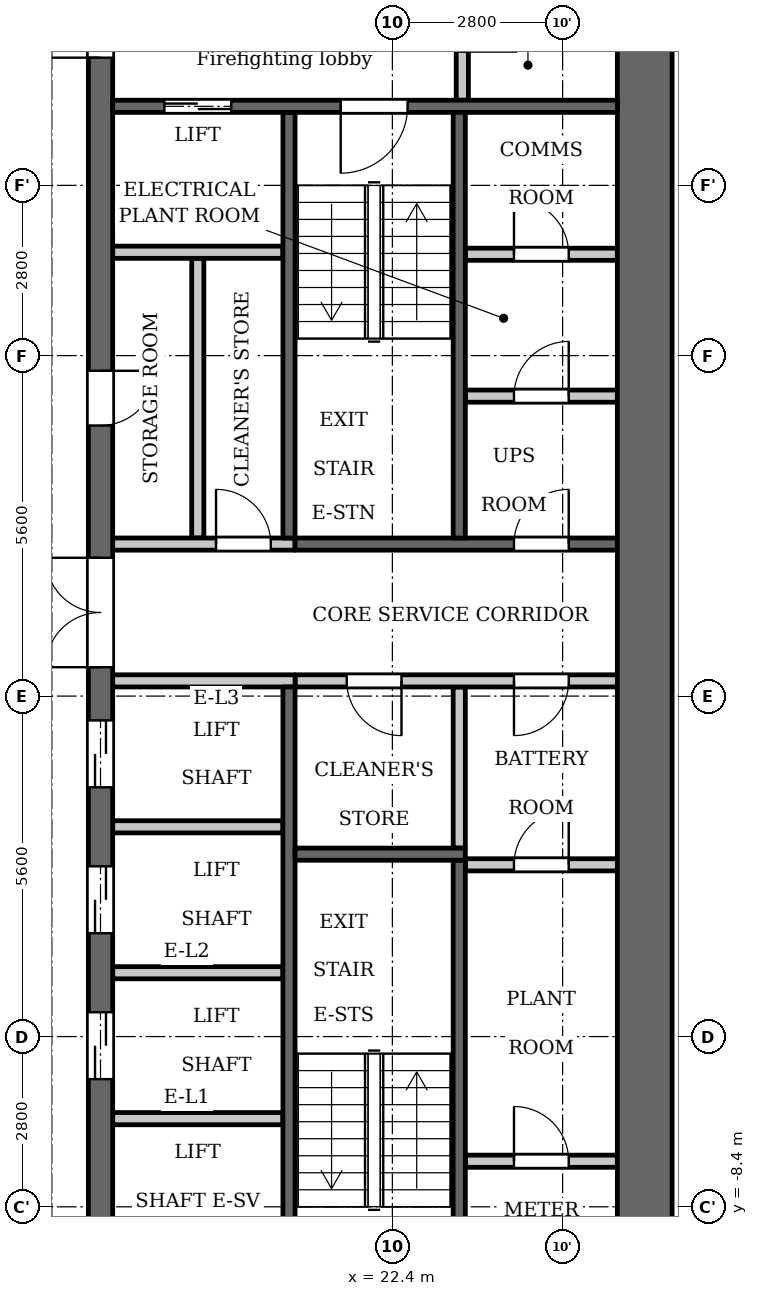
"""IFC4 building model, lengths in metres.
Left out: names, types, materials, properties, quantities, classifications, styles, units other than length and angle.
Written with IfcOpenShell. Run it as: python <this file> out.ifc"""

import sys

from ifc_helpers import new_model, si_unit, direction, frame, frame_2d, origin, place, context, subcontext, project, spatial, rectangle, extrude, element, fill, save


model = new_model("IFC4")
c1 = context("Model", 3, precision=1e-05, world=origin(), true_north=direction((0.0, 1.0)))
c2 = subcontext(c1, "Body", "Model", "MODEL_VIEW")
j1 = project(units=[si_unit("LENGTHUNIT", "METRE"), si_unit("PLANEANGLEUNIT", "RADIAN")], contexts=[c1])
p1 = place(None, origin())
s1 = spatial("IfcSite", under=j1, at=p1, CompositionType="ELEMENT")
p2 = place(p1, origin())
s2 = spatial("IfcBuilding", under=s1, at=p2, CompositionType="ELEMENT")
p3 = place(p2, frame((0.0, 0.0, 41.0)))
s3 = spatial("IfcBuildingStorey", under=s2, at=p3, CompositionType="ELEMENT", Elevation=41.0)
p4 = place(p3, frame((23.5, -2.5, 0.0), z_axis=(0.0, 0.0, 1.0), x_axis=(0.0, 1.0, 0.0)))
e1 = element("IfcWall", 1, at=p4, inside=s3, PredefinedType="PARTITIONING", context=c2, shape_type="SweptSolid", body=[
    extrude(rectangle(XDim=2.65, YDim=0.2, at=frame_2d((1.325, 0.0))), origin(), (0.0, 0.0, 1.0), 3.2),
])
p5 = place(p3, frame((20.7, 2.6, 0.0), z_axis=(0.0, 0.0, 1.0), x_axis=(0.0, 1.0, 0.0)))
e2 = element("IfcWall", 2, at=p5, inside=s3, PredefinedType="SHEAR", context=c2, shape_type="SweptSolid", body=[
    extrude(rectangle(XDim=7.0, YDim=0.2, at=frame_2d((3.5, 0.0))), origin(), (0.0, 0.0, 1.0), 3.2),
])
p6 = place(p3, frame((20.7, -9.6, 0.0), z_axis=(0.0, 0.0, 1.0), x_axis=(0.0, 1.0, 0.0)))
e3 = element("IfcWall", 3, at=p6, inside=s3, PredefinedType="SHEAR", context=c2, shape_type="SweptSolid", body=[
    extrude(rectangle(XDim=9.75, YDim=0.2, at=frame_2d((4.875, 0.0))), origin(), (0.0, 0.0, 1.0), 3.2),
])
p7 = place(p3, frame((20.8, 2.5, 0.0), z_axis=(0.0, 0.0, 1.0), x_axis=(1.0, 0.0, 0.0)))
e4 = element("IfcWall", 4, at=p7, inside=s3, PredefinedType="SHEAR", context=c2, shape_type="SweptSolid", body=[
    extrude(rectangle(XDim=5.3, YDim=0.2, at=frame_2d((2.65, 0.0))), origin(), (0.0, 0.0, 1.0), 3.2),
])
p8 = place(p7, frame((3.6, 0.0, 0.0)))
e5 = element("IfcOpeningElement", 5, at=p8, cuts=e4, PredefinedType="OPENING", context=c2, shape_type="SweptSolid", body=[
    extrude(rectangle(XDim=0.9, YDim=2.1, at=frame_2d((0.45, 1.05))), frame((0.0, 0.11, 0.0), z_axis=(0.0, -1.0, 0.0), x_axis=(1.0, 0.0, 0.0)), (0.0, 0.0, 1.0), 0.22),
])
p9 = place(p3, frame((20.8, 0.25, 0.0), z_axis=(0.0, 0.0, 1.0), x_axis=(1.0, 0.0, 0.0)))
e6 = element("IfcWall", 6, at=p9, inside=s3, PredefinedType="PARTITIONING", context=c2, shape_type="SweptSolid", body=[
    extrude(rectangle(XDim=5.3, YDim=0.2, at=frame_2d((2.65, 0.0))), origin(), (0.0, 0.0, 1.0), 3.2),
])
p10 = place(p9, frame((0.85, 0.0, 0.0)))
e7 = element("IfcOpeningElement", 7, at=p10, cuts=e6, PredefinedType="OPENING", context=c2, shape_type="SweptSolid", body=[
    extrude(rectangle(XDim=0.9, YDim=2.1, at=frame_2d((0.45, 1.05))), frame((0.0, 0.11, 0.0), z_axis=(0.0, -1.0, 0.0), x_axis=(1.0, 0.0, 0.0)), (0.0, 0.0, 1.0), 0.22),
])
p11 = place(p9, frame((3.6, 0.0, 0.0)))
e8 = element("IfcOpeningElement", 8, at=p11, cuts=e6, PredefinedType="OPENING", context=c2, shape_type="SweptSolid", body=[
    extrude(rectangle(XDim=0.9, YDim=2.1, at=frame_2d((0.45, 1.05))), frame((0.0, 0.11, 0.0), z_axis=(0.0, -1.0, 0.0), x_axis=(1.0, 0.0, 0.0)), (0.0, 0.0, 1.0), 0.22),
])
p12 = place(p3, frame((19.2, 2.6, 0.0), z_axis=(0.0, 0.0, 1.0), x_axis=(0.0, 1.0, 0.0)))
e9 = element("IfcWall", 9, at=p12, inside=s3, PredefinedType="PARTITIONING", context=c2, shape_type="SweptSolid", body=[
    extrude(rectangle(XDim=4.6, YDim=0.2, at=frame_2d((2.3, 0.0))), origin(), (0.0, 0.0, 1.0), 3.2),
])
p13 = place(p3, frame((17.6, -12.3, 0.0), z_axis=(0.0, 0.0, 1.0), x_axis=(0.0, 1.0, 0.0)))
e10 = element("IfcWall", 10, at=p13, inside=s3, PredefinedType="SHEAR", context=c2, shape_type="SweptSolid", body=[
    extrude(rectangle(XDim=24.6, YDim=0.4, at=frame_2d((12.3, 0.0))), origin(), (0.0, 0.0, 1.0), 3.2),
])
p14 = place(p13, frame((6.0, 0.0, 0.0)))
e11 = element("IfcOpeningElement", 11, at=p14, cuts=e10, PredefinedType="OPENING", context=c2, shape_type="SweptSolid", body=[
    extrude(rectangle(XDim=1.1, YDim=2.1, at=frame_2d((0.55, 1.05))), frame((0.0, 0.21, 0.0), z_axis=(0.0, -1.0, 0.0), x_axis=(1.0, 0.0, 0.0)), (0.0, 0.0, 1.0), 0.42),
])
p15 = place(p13, frame((8.4, 0.0, 0.0)))
e12 = element("IfcOpeningElement", 12, at=p15, cuts=e10, PredefinedType="OPENING", context=c2, shape_type="SweptSolid", body=[
    extrude(rectangle(XDim=1.1, YDim=2.1, at=frame_2d((0.55, 1.05))), frame((0.0, 0.21, 0.0), z_axis=(0.0, -1.0, 0.0), x_axis=(1.0, 0.0, 0.0)), (0.0, 0.0, 1.0), 0.42),
])
p16 = place(p13, frame((10.8, 0.0, 0.0)))
e13 = element("IfcOpeningElement", 13, at=p16, cuts=e10, PredefinedType="OPENING", context=c2, shape_type="SweptSolid", body=[
    extrude(rectangle(XDim=1.1, YDim=2.1, at=frame_2d((0.55, 1.05))), frame((0.0, 0.21, 0.0), z_axis=(0.0, -1.0, 0.0), x_axis=(1.0, 0.0, 0.0)), (0.0, 0.0, 1.0), 0.42),
])
p17 = place(p13, frame((16.75, 0.0, 0.0)))
e14 = element("IfcOpeningElement", 14, at=p17, cuts=e10, PredefinedType="OPENING", context=c2, shape_type="SweptSolid", body=[
    extrude(rectangle(XDim=0.9, YDim=2.1, at=frame_2d((0.45, 1.05))), frame((0.0, 0.21, 0.0), z_axis=(0.0, -1.0, 0.0), x_axis=(1.0, 0.0, 0.0)), (0.0, 0.0, 1.0), 0.42),
])
p18 = place(p13, frame((22.8, 0.0, 0.0)))
e15 = element("IfcOpeningElement", 15, at=p18, cuts=e10, PredefinedType="OPENING", context=c2, shape_type="SweptSolid", body=[
    extrude(rectangle(XDim=1.1, YDim=2.1, at=frame_2d((0.55, 1.05))), frame((0.0, 0.21, 0.0), z_axis=(0.0, -1.0, 0.0), x_axis=(1.0, 0.0, 0.0)), (0.0, 0.0, 1.0), 0.42),
])
p19 = place(p13, frame((0.7, 0.0, 0.0)))
e16 = element("IfcOpeningElement", 16, at=p19, cuts=e10, PredefinedType="OPENING", context=c2, shape_type="SweptSolid", body=[
    extrude(rectangle(XDim=1.1, YDim=2.1, at=frame_2d((0.55, 1.05))), frame((0.0, 0.21, 0.0), z_axis=(0.0, -1.0, 0.0), x_axis=(1.0, 0.0, 0.0)), (0.0, 0.0, 1.0), 0.42),
])
p20 = place(p13, frame((12.775, 0.0, 0.0)))
e17 = element("IfcOpeningElement", 17, at=p20, cuts=e10, PredefinedType="OPENING", context=c2, shape_type="SweptSolid", body=[
    extrude(rectangle(XDim=1.8, YDim=2.1, at=frame_2d((0.9, 1.05))), frame((0.0, 0.21, 0.0), z_axis=(0.0, -1.0, 0.0), x_axis=(1.0, 0.0, 0.0)), (0.0, 0.0, 1.0), 0.42),
])
p21 = place(p3, frame((26.55, -12.3, 0.0), z_axis=(0.0, 0.0, 1.0), x_axis=(0.0, 1.0, 0.0)))
e18 = element("IfcWall", 18, at=p21, inside=s3, PredefinedType="SHEAR", context=c2, shape_type="SweptSolid", body=[
    extrude(rectangle(XDim=24.6, YDim=0.9, at=frame_2d((12.3, 0.0))), origin(), (0.0, 0.0, 1.0), 3.2),
])
p22 = place(p3, frame((23.55, 9.8, 0.0), z_axis=(0.0, 0.0, 1.0), x_axis=(0.0, 1.0, 0.0)))
e19 = element("IfcWall", 19, at=p22, inside=s3, PredefinedType="PARTITIONING", context=c2, shape_type="SweptSolid", body=[
    extrude(rectangle(XDim=2.5, YDim=0.2, at=frame_2d((1.25, 0.0))), origin(), (0.0, 0.0, 1.0), 3.2),
])
p23 = place(p22, frame((0.8, 0.0, 0.0)))
e20 = element("IfcOpeningElement", 20, at=p23, cuts=e19, PredefinedType="OPENING", context=c2, shape_type="SweptSolid", body=[
    extrude(rectangle(XDim=0.9, YDim=2.1, at=frame_2d((0.45, 1.05))), frame((0.0, 0.11, 0.0), z_axis=(0.0, -1.0, 0.0), x_axis=(1.0, 0.0, 0.0)), (0.0, 0.0, 1.0), 0.22),
])
p24 = place(p3, frame((23.6, -7.65, 0.0), z_axis=(0.0, 0.0, 1.0), x_axis=(1.0, 0.0, 0.0)))
e21 = element("IfcWall", 21, at=p24, inside=s3, PredefinedType="PARTITIONING", context=c2, shape_type="SweptSolid", body=[
    extrude(rectangle(XDim=2.5, YDim=0.2, at=frame_2d((1.25, 0.0))), origin(), (0.0, 0.0, 1.0), 3.2),
])
p25 = place(p24, frame((0.8, 0.0, 0.0)))
e22 = element("IfcOpeningElement", 22, at=p25, cuts=e21, PredefinedType="OPENING", context=c2, shape_type="SweptSolid", body=[
    extrude(rectangle(XDim=0.9, YDim=2.1, at=frame_2d((0.45, 1.05))), frame((0.0, 0.11, 0.0), z_axis=(0.0, -1.0, 0.0), x_axis=(1.0, 0.0, 0.0)), (0.0, 0.0, 1.0), 0.22),
])
p26 = place(p3, frame((23.6, -2.775, 0.0), z_axis=(0.0, 0.0, 1.0), x_axis=(1.0, 0.0, 0.0)))
e23 = element("IfcWall", 23, at=p26, inside=s3, PredefinedType="PARTITIONING", context=c2, shape_type="SweptSolid", body=[
    extrude(rectangle(XDim=2.5, YDim=0.2, at=frame_2d((1.25, 0.0))), origin(), (0.0, 0.0, 1.0), 3.2),
])
p27 = place(p26, frame((0.8, 0.0, 0.0)))
e24 = element("IfcOpeningElement", 24, at=p27, cuts=e23, PredefinedType="OPENING", context=c2, shape_type="SweptSolid", body=[
    extrude(rectangle(XDim=0.9, YDim=2.1, at=frame_2d((0.45, 1.05))), frame((0.0, 0.11, 0.0), z_axis=(0.0, -1.0, 0.0), x_axis=(1.0, 0.0, 0.0)), (0.0, 0.0, 1.0), 0.22),
])
p28 = place(p3, frame((23.6, 4.933, 0.0), z_axis=(0.0, 0.0, 1.0), x_axis=(1.0, 0.0, 0.0)))
e25 = element("IfcWall", 25, at=p28, inside=s3, PredefinedType="PARTITIONING", context=c2, shape_type="SweptSolid", body=[
    extrude(rectangle(XDim=2.5, YDim=0.2, at=frame_2d((1.25, 0.0))), origin(), (0.0, 0.0, 1.0), 3.2),
])
p29 = place(p28, frame((0.8, 0.0, 0.0)))
e26 = element("IfcOpeningElement", 26, at=p29, cuts=e25, PredefinedType="OPENING", context=c2, shape_type="SweptSolid", body=[
    extrude(rectangle(XDim=0.9, YDim=2.1, at=frame_2d((0.45, 1.05))), frame((0.0, 0.11, 0.0), z_axis=(0.0, -1.0, 0.0), x_axis=(1.0, 0.0, 0.0)), (0.0, 0.0, 1.0), 0.22),
])
p30 = place(p3, frame((23.6, 7.267, 0.0), z_axis=(0.0, 0.0, 1.0), x_axis=(1.0, 0.0, 0.0)))
e27 = element("IfcWall", 27, at=p30, inside=s3, PredefinedType="PARTITIONING", context=c2, shape_type="SweptSolid", body=[
    extrude(rectangle(XDim=2.5, YDim=0.2, at=frame_2d((1.25, 0.0))), origin(), (0.0, 0.0, 1.0), 3.2),
])
p31 = place(p30, frame((0.8, 0.0, 0.0)))
e28 = element("IfcOpeningElement", 28, at=p31, cuts=e27, PredefinedType="OPENING", context=c2, shape_type="SweptSolid", body=[
    extrude(rectangle(XDim=0.9, YDim=2.1, at=frame_2d((0.45, 1.05))), frame((0.0, 0.11, 0.0), z_axis=(0.0, -1.0, 0.0), x_axis=(1.0, 0.0, 0.0)), (0.0, 0.0, 1.0), 0.22),
])
for number, where, z_axis, x_axis in (
    (29, (17.8, -6.95, 0.0), (0.0, 0.0, 1.0), (1.0, 0.0, 0.0)),
    (30, (17.8, -4.55, 0.0), (0.0, 0.0, 1.0), (1.0, 0.0, 0.0)),
    (31, (17.8, -2.15, 0.0), (0.0, 0.0, 1.0), (1.0, 0.0, 0.0)),
):
    element("IfcWall", number, at=place(p3, frame(where, z_axis=z_axis, x_axis=x_axis)), inside=s3, PredefinedType="PARTITIONING", context=c2, shape_type="SweptSolid", body=[
        extrude(rectangle(XDim=2.8, YDim=0.2, at=frame_2d((1.4, 0.0))), origin(), (0.0, 0.0, 1.0), 3.2),
    ])
p32 = place(p3, frame((17.8, 0.25, 0.0), z_axis=(0.0, 0.0, 1.0), x_axis=(1.0, 0.0, 0.0)))
e32 = element("IfcWall", 32, at=p32, inside=s3, PredefinedType="PARTITIONING", context=c2, shape_type="SweptSolid", body=[
    extrude(rectangle(XDim=3.0, YDim=0.2, at=frame_2d((1.5, 0.0))), origin(), (0.0, 0.0, 1.0), 3.2),
])
p33 = place(p3, frame((17.8, 2.5, 0.0), z_axis=(0.0, 0.0, 1.0), x_axis=(1.0, 0.0, 0.0)))
e33 = element("IfcWall", 33, at=p33, inside=s3, PredefinedType="PARTITIONING", context=c2, shape_type="SweptSolid", body=[
    extrude(rectangle(XDim=3.0, YDim=0.2, at=frame_2d((1.5, 0.0))), origin(), (0.0, 0.0, 1.0), 3.2),
])
p34 = place(p33, frame((1.7, 0.0, 0.0)))
e34 = element("IfcOpeningElement", 34, at=p34, cuts=e33, PredefinedType="OPENING", context=c2, shape_type="SweptSolid", body=[
    extrude(rectangle(XDim=0.9, YDim=2.1, at=frame_2d((0.45, 1.05))), frame((0.0, 0.11, 0.0), z_axis=(0.0, -1.0, 0.0), x_axis=(1.0, 0.0, 0.0)), (0.0, 0.0, 1.0), 0.22),
])
p35 = place(p3, frame((17.8, 7.3, 0.0), z_axis=(0.0, 0.0, 1.0), x_axis=(1.0, 0.0, 0.0)))
e35 = element("IfcWall", 35, at=p35, inside=s3, PredefinedType="PARTITIONING", context=c2, shape_type="SweptSolid", body=[
    extrude(rectangle(XDim=2.8, YDim=0.2, at=frame_2d((1.4, 0.0))), origin(), (0.0, 0.0, 1.0), 3.2),
])
p36 = place(p3, frame((17.8, 9.7, 0.0), z_axis=(0.0, 0.0, 1.0), x_axis=(1.0, 0.0, 0.0)))
e36 = element("IfcWall", 36, at=p36, inside=s3, PredefinedType="SHEAR", context=c2, shape_type="SweptSolid", body=[
    extrude(rectangle(XDim=8.3, YDim=0.2, at=frame_2d((4.15, 0.0))), origin(), (0.0, 0.0, 1.0), 3.2),
])
p37 = place(p36, frame((0.85, 0.0, 0.0)))
e37 = element("IfcOpeningElement", 37, at=p37, cuts=e36, PredefinedType="OPENING", context=c2, shape_type="SweptSolid", body=[
    extrude(rectangle(XDim=1.1, YDim=2.1, at=frame_2d((0.55, 1.05))), frame((0.0, 0.11, 0.0), z_axis=(0.0, -1.0, 0.0), x_axis=(1.0, 0.0, 0.0)), (0.0, 0.0, 1.0), 0.22),
])
p38 = place(p36, frame((3.75, 0.0, 0.0)))
e38 = element("IfcOpeningElement", 38, at=p38, cuts=e36, PredefinedType="OPENING", context=c2, shape_type="SweptSolid", body=[
    extrude(rectangle(XDim=1.1, YDim=2.1, at=frame_2d((0.55, 1.05))), frame((0.0, 0.11, 0.0), z_axis=(0.0, -1.0, 0.0), x_axis=(1.0, 0.0, 0.0)), (0.0, 0.0, 1.0), 0.22),
])
p39 = place(p3, frame((23.5, 2.6, 0.0), z_axis=(0.0, 0.0, 1.0), x_axis=(0.0, 1.0, 0.0)))
e39 = element("IfcWall", 39, at=p39, inside=s3, PredefinedType="SHEAR", context=c2, shape_type="SweptSolid", body=[
    extrude(rectangle(XDim=7.0, YDim=0.2, at=frame_2d((3.5, 0.0))), origin(), (0.0, 0.0, 1.0), 3.2),
])
p40 = place(p3, frame((23.5, -9.6, 0.0), z_axis=(0.0, 0.0, 1.0), x_axis=(0.0, 1.0, 0.0)))
e40 = element("IfcWall", 40, at=p40, inside=s3, PredefinedType="SHEAR", context=c2, shape_type="SweptSolid", body=[
    extrude(rectangle(XDim=6.9, YDim=0.2, at=frame_2d((3.45, 0.0))), origin(), (0.0, 0.0, 1.0), 3.2),
])
p41 = place(p3, frame((20.8, -2.6, 0.0), z_axis=(0.0, 0.0, 1.0), x_axis=(1.0, 0.0, 0.0)))
e41 = element("IfcWall", 41, at=p41, inside=s3, PredefinedType="SHEAR", context=c2, shape_type="SweptSolid", body=[
    extrude(rectangle(XDim=2.8, YDim=0.2, at=frame_2d((1.4, 0.0))), origin(), (0.0, 0.0, 1.0), 3.2),
])
p42 = place(p14, origin())
e42 = element("IfcDoor", 42, at=p42, inside=s3, OperationType="DOUBLE_DOOR_SLIDING", PredefinedType="DOOR", context=c2, shape_type="SweptSolid", body=[
    extrude(rectangle(XDim=1.1, YDim=2.1, at=frame_2d((0.55, 1.05))), frame((0.0, 0.025, 0.0), z_axis=(0.0, -1.0, 0.0), x_axis=(1.0, 0.0, 0.0)), (0.0, 0.0, 1.0), 0.05),
])
fill(e11, e42)
p43 = place(p15, origin())
e43 = element("IfcDoor", 43, at=p43, inside=s3, OperationType="DOUBLE_DOOR_SLIDING", PredefinedType="DOOR", context=c2, shape_type="SweptSolid", body=[
    extrude(rectangle(XDim=1.1, YDim=2.1, at=frame_2d((0.55, 1.05))), frame((0.0, 0.025, 0.0), z_axis=(0.0, -1.0, 0.0), x_axis=(1.0, 0.0, 0.0)), (0.0, 0.0, 1.0), 0.05),
])
fill(e12, e43)
p44 = place(p16, origin())
e44 = element("IfcDoor", 44, at=p44, inside=s3, OperationType="DOUBLE_DOOR_SLIDING", PredefinedType="DOOR", context=c2, shape_type="SweptSolid", body=[
    extrude(rectangle(XDim=1.1, YDim=2.1, at=frame_2d((0.55, 1.05))), frame((0.0, 0.025, 0.0), z_axis=(0.0, -1.0, 0.0), x_axis=(1.0, 0.0, 0.0)), (0.0, 0.0, 1.0), 0.05),
])
fill(e13, e44)
p45 = place(p17, origin())
e45 = element("IfcDoor", 45, at=p45, inside=s3, OperationType="SINGLE_SWING_RIGHT", PredefinedType="DOOR", context=c2, shape_type="SweptSolid", body=[
    extrude(rectangle(XDim=0.9, YDim=2.1, at=frame_2d((0.45, 1.05))), frame((0.0, 0.025, 0.0), z_axis=(0.0, -1.0, 0.0), x_axis=(1.0, 0.0, 0.0)), (0.0, 0.0, 1.0), 0.05),
])
fill(e14, e45)
p46 = place(p34, origin())
e46 = element("IfcDoor", 46, at=p46, inside=s3, OperationType="SINGLE_SWING_RIGHT", PredefinedType="DOOR", context=c2, shape_type="SweptSolid", body=[
    extrude(rectangle(XDim=0.9, YDim=2.1, at=frame_2d((0.45, 1.05))), frame((0.0, 0.025, 0.0), z_axis=(0.0, -1.0, 0.0), x_axis=(1.0, 0.0, 0.0)), (0.0, 0.0, 1.0), 0.05),
])
fill(e34, e46)
p47 = place(p37, origin())
e47 = element("IfcDoor", 47, at=p47, inside=s3, OperationType="DOUBLE_DOOR_SLIDING", PredefinedType="DOOR", context=c2, shape_type="SweptSolid", body=[
    extrude(rectangle(XDim=1.1, YDim=2.1, at=frame_2d((0.55, 1.05))), frame((0.0, 0.025, 0.0), z_axis=(0.0, -1.0, 0.0), x_axis=(1.0, 0.0, 0.0)), (0.0, 0.0, 1.0), 0.05),
])
fill(e37, e47)
p48 = place(p18, origin())
e48 = element("IfcDoor", 48, at=p48, inside=s3, OperationType="SINGLE_SWING_RIGHT", PredefinedType="DOOR", context=c2, shape_type="SweptSolid", body=[
    extrude(rectangle(XDim=1.1, YDim=2.1, at=frame_2d((0.55, 1.05))), frame((0.0, 0.025, 0.0), z_axis=(0.0, -1.0, 0.0), x_axis=(1.0, 0.0, 0.0)), (0.0, 0.0, 1.0), 0.05),
])
fill(e15, e48)
p49 = place(p38, origin())
e49 = element("IfcDoor", 49, at=p49, inside=s3, OperationType="SINGLE_SWING_LEFT", PredefinedType="DOOR", context=c2, shape_type="SweptSolid", body=[
    extrude(rectangle(XDim=1.1, YDim=2.1, at=frame_2d((0.55, 1.05))), frame((0.0, 0.025, 0.0), z_axis=(0.0, -1.0, 0.0), x_axis=(1.0, 0.0, 0.0)), (0.0, 0.0, 1.0), 0.05),
])
fill(e38, e49)
p50 = place(p20, origin())
e50 = element("IfcDoor", 50, at=p50, inside=s3, OperationType="DOUBLE_DOOR_SINGLE_SWING", PredefinedType="DOOR", context=c2, shape_type="SweptSolid", body=[
    extrude(rectangle(XDim=1.8, YDim=2.1, at=frame_2d((0.9, 1.05))), frame((0.0, 0.025, 0.0), z_axis=(0.0, -1.0, 0.0), x_axis=(1.0, 0.0, 0.0)), (0.0, 0.0, 1.0), 0.05),
])
fill(e17, e50)
p51 = place(p10, origin())
e51 = element("IfcDoor", 51, at=p51, inside=s3, OperationType="SINGLE_SWING_RIGHT", PredefinedType="DOOR", context=c2, shape_type="SweptSolid", body=[
    extrude(rectangle(XDim=0.9, YDim=2.1, at=frame_2d((0.45, 1.05))), frame((0.0, 0.025, 0.0), z_axis=(0.0, -1.0, 0.0), x_axis=(1.0, 0.0, 0.0)), (0.0, 0.0, 1.0), 0.05),
])
fill(e7, e51)
p52 = place(p25, origin())
e52 = element("IfcDoor", 52, at=p52, inside=s3, OperationType="SINGLE_SWING_RIGHT", PredefinedType="DOOR", context=c2, shape_type="SweptSolid", body=[
    extrude(rectangle(XDim=0.9, YDim=2.1, at=frame_2d((0.45, 1.05))), frame((0.0, 0.025, 0.0), z_axis=(0.0, -1.0, 0.0), x_axis=(1.0, 0.0, 0.0)), (0.0, 0.0, 1.0), 0.05),
])
fill(e22, e52)
p53 = place(p27, origin())
e53 = element("IfcDoor", 53, at=p53, inside=s3, OperationType="SINGLE_SWING_LEFT", PredefinedType="DOOR", context=c2, shape_type="SweptSolid", body=[
    extrude(rectangle(XDim=0.9, YDim=2.1, at=frame_2d((0.45, 1.05))), frame((0.0, 0.025, 0.0), z_axis=(0.0, -1.0, 0.0), x_axis=(1.0, 0.0, 0.0)), (0.0, 0.0, 1.0), 0.05),
])
fill(e24, e53)
p54 = place(p11, origin())
e54 = element("IfcDoor", 54, at=p54, inside=s3, OperationType="SINGLE_SWING_LEFT", PredefinedType="DOOR", context=c2, shape_type="SweptSolid", body=[
    extrude(rectangle(XDim=0.9, YDim=2.1, at=frame_2d((0.45, 1.05))), frame((0.0, 0.025, 0.0), z_axis=(0.0, -1.0, 0.0), x_axis=(1.0, 0.0, 0.0)), (0.0, 0.0, 1.0), 0.05),
])
fill(e8, e54)
p55 = place(p29, origin())
e55 = element("IfcDoor", 55, at=p55, inside=s3, OperationType="SINGLE_SWING_LEFT", PredefinedType="DOOR", context=c2, shape_type="SweptSolid", body=[
    extrude(rectangle(XDim=0.9, YDim=2.1, at=frame_2d((0.45, 1.05))), frame((0.0, 0.025, 0.0), z_axis=(0.0, -1.0, 0.0), x_axis=(1.0, 0.0, 0.0)), (0.0, 0.0, 1.0), 0.05),
])
fill(e26, e55)
p56 = place(p31, origin())
e56 = element("IfcDoor", 56, at=p56, inside=s3, OperationType="SINGLE_SWING_RIGHT", PredefinedType="DOOR", context=c2, shape_type="SweptSolid", body=[
    extrude(rectangle(XDim=0.9, YDim=2.1, at=frame_2d((0.45, 1.05))), frame((0.0, 0.025, 0.0), z_axis=(0.0, -1.0, 0.0), x_axis=(1.0, 0.0, 0.0)), (0.0, 0.0, 1.0), 0.05),
])
fill(e28, e56)
p57 = place(p8, origin())
e57 = element("IfcDoor", 57, at=p57, inside=s3, OperationType="SINGLE_SWING_LEFT", PredefinedType="DOOR", context=c2, shape_type="SweptSolid", body=[
    extrude(rectangle(XDim=0.9, YDim=2.1, at=frame_2d((0.45, 1.05))), frame((0.0, 0.025, 0.0), z_axis=(0.0, -1.0, 0.0), x_axis=(1.0, 0.0, 0.0)), (0.0, 0.0, 1.0), 0.05),
])
fill(e5, e57)
save(model, sys.argv[1])
